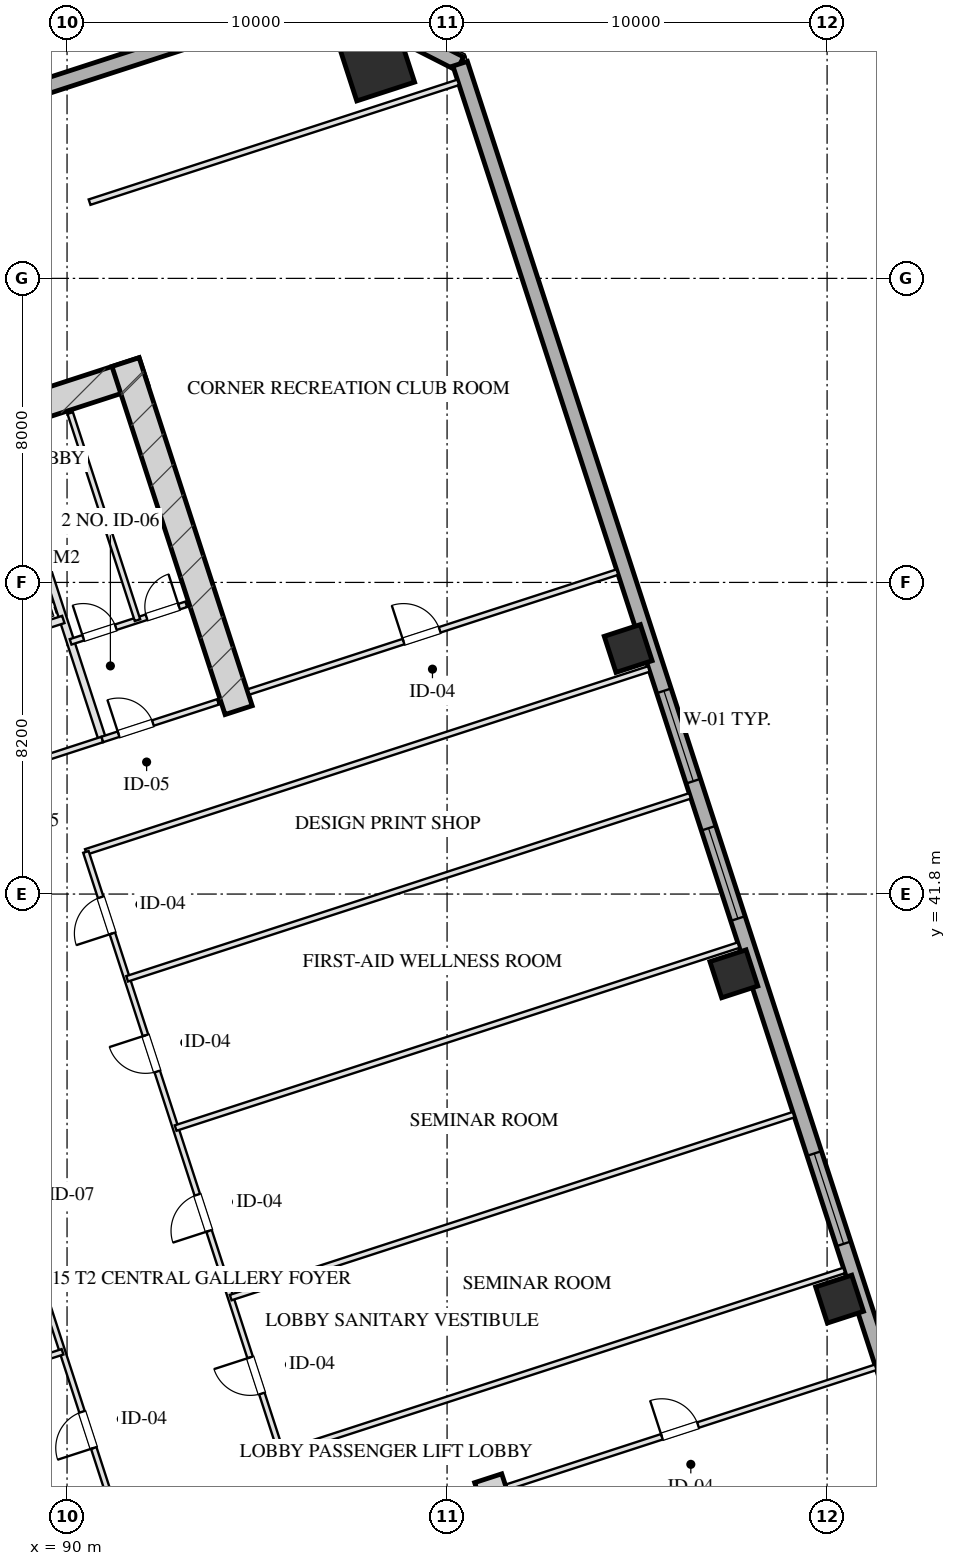
"""IFC4 building model, lengths in metres.
Left out: names, types, materials, properties, quantities, classifications, styles, units other than length and angle.
Written with IfcOpenShell. Run it as: python <this file> out.ifc"""

import sys

from ifc_helpers import new_model, si_unit, direction, frame, frame_2d, origin, origin_2d, place, context, subcontext, project, spatial, rectangle, hollow_rectangle, extrude, element, fill, save


model = new_model("IFC4")
c1 = context("Model", 3, precision=1e-05, world=origin(), true_north=direction((0.0, 1.0)))
c2 = subcontext(c1, "Body", "Model", "MODEL_VIEW")
j1 = project(units=[si_unit("LENGTHUNIT", "METRE"), si_unit("PLANEANGLEUNIT", "RADIAN")], contexts=[c1])
p1 = place(None, origin())
s1 = spatial("IfcSite", under=j1, at=p1, CompositionType="ELEMENT")
p2 = place(p1, origin())
s2 = spatial("IfcBuilding", under=s1, at=p2, CompositionType="ELEMENT")
p3 = place(p2, frame((0.0, 0.0, 64.4)))
s3 = spatial("IfcBuildingStorey", under=s2, at=p3, CompositionType="ELEMENT", Elevation=64.4)
p4 = place(p3, frame((101.082, 26.429, 0.0), z_axis=(0.0, 0.0, 1.0), x_axis=(0.309016134813, -0.951056795583, 0.0)))
e1 = element("IfcWall", 1, at=p4, inside=s3, PredefinedType="SHEAR", context=c2, shape_type="SweptSolid", body=[
    extrude(rectangle(XDim=9.63, YDim=0.75, at=frame_2d((4.815, 0.0))), origin(), (0.0, 0.0, 1.0), 3.45),
])
p5 = place(p3, frame((76.272, 50.443, 0.0), z_axis=(0.0, 0.0, 1.0), x_axis=(0.951056072937, 0.309018358888, 0.0)))
e2 = element("IfcWall", 2, at=p5, inside=s3, PredefinedType="SHEAR", context=c2, shape_type="SweptSolid", body=[
    extrude(rectangle(XDim=16.55, YDim=0.75, at=frame_2d((8.275, 0.0))), origin(), (0.0, 0.0, 1.0), 3.45),
])
p6 = place(p3, frame((94.515, 46.639, 0.0), z_axis=(0.0, 0.0, 1.0), x_axis=(-0.309016134813, 0.951056795583, 0.0)))
e3 = element("IfcWall", 3, at=p6, inside=s3, PredefinedType="SHEAR", context=c2, shape_type="SweptSolid", body=[
    extrude(rectangle(XDim=9.63, YDim=0.75, at=frame_2d((4.815, 0.0))), origin(), (0.0, 0.0, 1.0), 3.45),
])
p7 = place(p3, frame((98.137, 63.677, 0.0), z_axis=(0.0, 0.0, 1.0), x_axis=(0.951056516295, 0.309016994375, 0.0)))
e4 = element("IfcColumn", 4, at=p7, inside=s3, PredefinedType="COLUMN", context=c2, shape_type="SweptSolid", body=[
    extrude(hollow_rectangle(XDim=1.6, YDim=1.6, WallThickness=0.055, at=origin_2d()), origin(), (0.0, 0.0, 1.0), 3.451),
])
for number, where, z_axis, x_axis in (
    (5, (110.328, 31.142, 0.0), (0.0, 0.0, 1.0), (0.951, 0.309, 0.0)),
    (6, (107.547, 39.701, 0.0), (0.0, 0.0, 1.0), (0.951, 0.309, 0.0)),
    (7, (104.766, 48.261, 0.0), (0.0, 0.0, 1.0), (0.951, 0.309, 0.0)),
):
    element("IfcColumn", number, at=place(p3, frame(where, z_axis=z_axis, x_axis=x_axis)), inside=s3, PredefinedType="COLUMN", context=c2, shape_type="SweptSolid", body=[
        extrude(hollow_rectangle(XDim=1.0, YDim=1.0, WallThickness=0.036, at=origin_2d()), origin(), (0.0, 0.0, 1.0), 3.451),
    ])
p8 = place(p3, frame((66.002, 55.433, 0.0), z_axis=(0.0, 0.0, 1.0), x_axis=(0.951055939317, 0.309018770125, 0.0)))
e8 = element("IfcWall", 8, at=p8, inside=s3, PredefinedType="SOLIDWALL", context=c2, shape_type="SweptSolid", body=[
    extrude(rectangle(XDim=32.4, YDim=0.4, at=frame_2d((16.2, 0.0))), origin(), (0.0, 0.0, 1.0), 2.61),
])
p9 = place(p3, frame((96.816, 65.446, 0.0), z_axis=(0.0, 0.0, 1.0), x_axis=(0.890998089617, -0.454007053137, 0.0)))
e9 = element("IfcWall", 9, at=p9, inside=s3, PredefinedType="SOLIDWALL", context=c2, shape_type="SweptSolid", body=[
    extrude(rectangle(XDim=3.96, YDim=0.4, at=frame_2d((1.98, 0.0))), origin(), (0.0, 0.0, 1.0), 2.61),
])
p10 = place(p3, frame((100.345, 63.648, 0.0), z_axis=(0.0, 0.0, 1.0), x_axis=(0.309014526607, -0.951057318118, 0.0)))
e10 = element("IfcWall", 10, at=p10, inside=s3, PredefinedType="SOLIDWALL", context=c2, shape_type="SweptSolid", body=[
    extrude(rectangle(XDim=50.0, YDim=0.4, at=frame_2d((25.0, 0.0))), origin(), (0.0, 0.0, 1.0), 2.61),
])
p11 = place(p10, frame((30.15, 0.0, 0.75)))
e11 = element("IfcOpeningElement", 11, at=p11, cuts=e10, PredefinedType="OPENING", context=c2, shape_type="SweptSolid", body=[
    extrude(rectangle(XDim=2.5, YDim=1.46, at=frame_2d((1.25, 0.73))), frame((0.0, 0.21, 0.0), z_axis=(0.0, -1.0, 0.0), x_axis=(1.0, 0.0, 0.0)), (0.0, 0.0, 1.0), 0.42),
])
p12 = place(p10, frame((21.15, 0.0, 0.75)))
e12 = element("IfcOpeningElement", 12, at=p12, cuts=e10, PredefinedType="OPENING", context=c2, shape_type="SweptSolid", body=[
    extrude(rectangle(XDim=2.5, YDim=1.46, at=frame_2d((1.25, 0.73))), frame((0.0, 0.21, 0.0), z_axis=(0.0, -1.0, 0.0), x_axis=(1.0, 0.0, 0.0)), (0.0, 0.0, 1.0), 0.42),
])
p13 = place(p10, frame((17.35, 0.0, 0.75)))
e13 = element("IfcOpeningElement", 13, at=p13, cuts=e10, PredefinedType="OPENING", context=c2, shape_type="SweptSolid", body=[
    extrude(rectangle(XDim=2.5, YDim=1.46, at=frame_2d((1.25, 0.73))), frame((0.0, 0.21, 0.0), z_axis=(0.0, -1.0, 0.0), x_axis=(1.0, 0.0, 0.0)), (0.0, 0.0, 1.0), 0.42),
])
p14 = place(p3, frame((90.928, 45.868, 0.0), z_axis=(0.0, 0.0, 1.0), x_axis=(-0.309042196757, 0.951048327176, 0.0)))
e14 = element("IfcWall", 14, at=p14, inside=s3, PredefinedType="PARTITIONING", context=c2, shape_type="SweptSolid", body=[
    extrude(rectangle(XDim=8.43, YDim=0.2, at=frame_2d((4.215, 0.0))), origin(), (0.0, 0.0, 1.0), 3.175),
])
p15 = place(p3, frame((86.743, 44.508, 0.0), z_axis=(0.0, 0.0, 1.0), x_axis=(0.951063829732, 0.308994485023, 0.0)))
e15 = element("IfcWall", 15, at=p15, inside=s3, PredefinedType="PARTITIONING", context=c2, shape_type="SweptSolid", body=[
    extrude(rectangle(XDim=4.4, YDim=0.15, at=frame_2d((2.2, 0.0))), origin(), (0.0, 0.0, 1.0), 3.175),
])
p16 = place(p15, frame((1.45, 0.0, 0.0)))
e16 = element("IfcOpeningElement", 16, at=p16, cuts=e15, PredefinedType="OPENING", context=c2, shape_type="SweptSolid", body=[
    extrude(rectangle(XDim=1.5, YDim=2.05, at=frame_2d((0.75, 1.025))), frame((0.0, 0.085, 0.0), z_axis=(0.0, -1.0, 0.0), x_axis=(1.0, 0.0, 0.0)), (0.0, 0.0, 1.0), 0.17),
])
p17 = place(p3, frame((85.718, 47.666, 0.0), z_axis=(0.0, 0.0, 1.0), x_axis=(0.951058531764, 0.30901079133, 0.0)))
e17 = element("IfcWall", 17, at=p17, inside=s3, PredefinedType="PARTITIONING", context=c2, shape_type="SweptSolid", body=[
    extrude(rectangle(XDim=4.4, YDim=0.2, at=frame_2d((2.2, 0.0))), origin(), (0.0, 0.0, 1.0), 3.175),
])
p18 = place(p17, frame((0.45, 0.0, 0.0)))
e18 = element("IfcOpeningElement", 18, at=p18, cuts=e17, PredefinedType="OPENING", context=c2, shape_type="SweptSolid", body=[
    extrude(rectangle(XDim=1.1, YDim=2.05, at=frame_2d((0.55, 1.025))), frame((0.0, 0.11, 0.0), z_axis=(0.0, -1.0, 0.0), x_axis=(1.0, 0.0, 0.0)), (0.0, 0.0, 1.0), 0.22),
])
p19 = place(p17, frame((2.55, 0.0, 0.0)))
e19 = element("IfcOpeningElement", 19, at=p19, cuts=e17, PredefinedType="OPENING", context=c2, shape_type="SweptSolid", body=[
    extrude(rectangle(XDim=1.1, YDim=2.05, at=frame_2d((0.55, 1.025))), frame((0.0, 0.11, 0.0), z_axis=(0.0, -1.0, 0.0), x_axis=(1.0, 0.0, 0.0)), (0.0, 0.0, 1.0), 0.22),
])
p20 = place(p3, frame((90.928, 45.868, 0.0), z_axis=(0.0, 0.0, 1.0), x_axis=(0.951059297078, 0.309008435874, 0.0)))
e20 = element("IfcWall", 20, at=p20, inside=s3, PredefinedType="PARTITIONING", context=c2, shape_type="SweptSolid", body=[
    extrude(rectangle(XDim=3.2, YDim=0.15, at=frame_2d((1.6, 0.0))), origin(), (0.0, 0.0, 1.0), 3.175),
])
p21 = place(p20, frame((0.45, 0.0, 0.0)))
e21 = element("IfcOpeningElement", 21, at=p21, cuts=e20, PredefinedType="OPENING", context=c2, shape_type="SweptSolid", body=[
    extrude(rectangle(XDim=0.95, YDim=2.05, at=frame_2d((0.475, 1.025))), frame((0.0, 0.085, 0.0), z_axis=(0.0, -1.0, 0.0), x_axis=(1.0, 0.0, 0.0)), (0.0, 0.0, 1.0), 0.17),
])
p22 = place(p3, frame((90.094, 48.436, 0.0), z_axis=(0.0, 0.0, 1.0), x_axis=(0.951066581729, 0.308986014439, 0.0)))
e22 = element("IfcWall", 22, at=p22, inside=s3, PredefinedType="PARTITIONING", context=c2, shape_type="SweptSolid", body=[
    extrude(rectangle(XDim=3.2, YDim=0.15, at=frame_2d((1.6, 0.0))), origin(), (0.0, 0.0, 1.0), 3.175),
])
p23 = place(p22, frame((0.35, 0.0, 0.0)))
e23 = element("IfcOpeningElement", 23, at=p23, cuts=e22, PredefinedType="OPENING", context=c2, shape_type="SweptSolid", body=[
    extrude(rectangle(XDim=0.9, YDim=2.05, at=frame_2d((0.45, 1.025))), frame((0.0, 0.085, 0.0), z_axis=(0.0, -1.0, 0.0), x_axis=(1.0, 0.0, 0.0)), (0.0, 0.0, 1.0), 0.17),
])
p24 = place(p22, frame((2.1, 0.0, 0.0)))
e24 = element("IfcOpeningElement", 24, at=p24, cuts=e22, PredefinedType="OPENING", context=c2, shape_type="SweptSolid", body=[
    extrude(rectangle(XDim=0.9, YDim=2.05, at=frame_2d((0.45, 1.025))), frame((0.0, 0.085, 0.0), z_axis=(0.0, -1.0, 0.0), x_axis=(1.0, 0.0, 0.0)), (0.0, 0.0, 1.0), 0.17),
])
p25 = place(p3, frame((91.853, 49.007, 0.0), z_axis=(0.0, 0.0, 1.0), x_axis=(-0.309022487551, 0.951054731437, 0.0)))
e25 = element("IfcWall", 25, at=p25, inside=s3, PredefinedType="PARTITIONING", context=c2, shape_type="SweptSolid", body=[
    extrude(rectangle(XDim=5.73, YDim=0.15, at=frame_2d((2.865, 0.0))), origin(), (0.0, 0.0, 1.0), 3.175),
])
p26 = place(p3, frame((101.578, 26.196, 0.0), z_axis=(0.0, 0.0, 1.0), x_axis=(0.951059043131, 0.309009217467, 0.0)))
e26 = element("IfcWall", 26, at=p26, inside=s3, PredefinedType="PARTITIONING", context=c2, shape_type="SweptSolid", body=[
    extrude(rectangle(XDim=10.2, YDim=0.15, at=frame_2d((5.1, 0.0))), origin(), (0.0, 0.0, 1.0), 3.175),
])
p27 = place(p26, frame((4.284, 0.0, 0.0)))
e27 = element("IfcOpeningElement", 27, at=p27, cuts=e26, PredefinedType="OPENING", context=c2, shape_type="SweptSolid", body=[
    extrude(rectangle(XDim=1.0, YDim=2.05, at=frame_2d((0.5, 1.025))), frame((0.0, 0.085, 0.0), z_axis=(0.0, -1.0, 0.0), x_axis=(1.0, 0.0, 0.0)), (0.0, 0.0, 1.0), 0.17),
])
p28 = place(p3, frame((90.593, 60.006, 0.0), z_axis=(0.0, 0.0, 1.0), x_axis=(0.951059043131, 0.309009217467, 0.0)))
e28 = element("IfcWall", 28, at=p28, inside=s3, PredefinedType="PARTITIONING", context=c2, shape_type="SweptSolid", body=[
    extrude(rectangle(XDim=10.2, YDim=0.15, at=frame_2d((5.1, 0.0))), origin(), (0.0, 0.0, 1.0), 3.175),
])
p29 = place(p3, frame((94.78, 47.119, 0.0), z_axis=(0.0, 0.0, 1.0), x_axis=(0.951054294345, 0.309023832749, 0.0)))
e29 = element("IfcWall", 29, at=p29, inside=s3, PredefinedType="PARTITIONING", context=c2, shape_type="SweptSolid", body=[
    extrude(rectangle(XDim=10.2, YDim=0.15, at=frame_2d((5.1, 0.0))), origin(), (0.0, 0.0, 1.0), 3.175),
])
p30 = place(p29, frame((4.284, 0.0, 0.0)))
e30 = element("IfcOpeningElement", 30, at=p30, cuts=e29, PredefinedType="OPENING", context=c2, shape_type="SweptSolid", body=[
    extrude(rectangle(XDim=1.0, YDim=2.05, at=frame_2d((0.5, 1.025))), frame((0.0, 0.085, 0.0), z_axis=(0.0, -1.0, 0.0), x_axis=(1.0, 0.0, 0.0)), (0.0, 0.0, 1.0), 0.17),
])
for number, where, z_axis, x_axis in (
    (31, (95.638, 27.084, 0.0), (0.0, 0.0, 1.0), (0.951, 0.309, 0.0)),
    (32, (90.496, 42.909, 0.0), (0.0, 0.0, 1.0), (0.951, 0.309, 0.0)),
):
    element("IfcWall", number, at=place(p3, frame(where, z_axis=z_axis, x_axis=x_axis)), inside=s3, PredefinedType="PARTITIONING", context=c2, shape_type="SweptSolid", body=[
        extrude(rectangle(XDim=15.575, YDim=0.15, at=frame_2d((7.788, 0.0))), origin(), (0.0, 0.0, 1.0), 3.175),
    ])
p31 = place(p3, frame((91.216, 25.647, 0.0), z_axis=(0.0, 0.0, 1.0), x_axis=(-0.309022042254, 0.951054876125, 0.0)))
e33 = element("IfcWall", 33, at=p31, inside=s3, PredefinedType="PARTITIONING", context=c2, shape_type="SweptSolid", body=[
    extrude(rectangle(XDim=16.64, YDim=0.15, at=frame_2d((8.32, 0.0))), origin(), (0.0, 0.0, 1.0), 3.175),
])
p32 = place(p31, frame((1.66, 0.0, 0.0)))
e34 = element("IfcOpeningElement", 34, at=p32, cuts=e33, PredefinedType="OPENING", context=c2, shape_type="SweptSolid", body=[
    extrude(rectangle(XDim=1.0, YDim=2.05, at=frame_2d((0.5, 1.025))), frame((0.0, 0.085, 0.0), z_axis=(0.0, -1.0, 0.0), x_axis=(1.0, 0.0, 0.0)), (0.0, 0.0, 1.0), 0.17),
])
p33 = place(p31, frame((7.82, 0.0, 0.0)))
e35 = element("IfcOpeningElement", 35, at=p33, cuts=e33, PredefinedType="OPENING", context=c2, shape_type="SweptSolid", body=[
    extrude(rectangle(XDim=1.05, YDim=2.05, at=frame_2d((0.525, 1.025))), frame((0.0, 0.085, 0.0), z_axis=(0.0, -1.0, 0.0), x_axis=(1.0, 0.0, 0.0)), (0.0, 0.0, 1.0), 0.17),
])
p34 = place(p31, frame((13.98, 0.0, 0.0)))
e36 = element("IfcOpeningElement", 36, at=p34, cuts=e33, PredefinedType="OPENING", context=c2, shape_type="SweptSolid", body=[
    extrude(rectangle(XDim=1.0, YDim=2.05, at=frame_2d((0.5, 1.025))), frame((0.0, 0.085, 0.0), z_axis=(0.0, -1.0, 0.0), x_axis=(1.0, 0.0, 0.0)), (0.0, 0.0, 1.0), 0.17),
])
p35 = place(p3, frame((95.638, 27.084, 0.0), z_axis=(0.0, 0.0, 1.0), x_axis=(-0.30901773025, 0.951056277195, 0.0)))
e37 = element("IfcWall", 37, at=p35, inside=s3, PredefinedType="PARTITIONING", context=c2, shape_type="SweptSolid", body=[
    extrude(rectangle(XDim=16.64, YDim=0.15, at=frame_2d((8.32, 0.0))), origin(), (0.0, 0.0, 1.0), 3.175),
])
p36 = place(p35, frame((1.655, 0.0, 0.0)))
e38 = element("IfcOpeningElement", 38, at=p36, cuts=e37, PredefinedType="OPENING", context=c2, shape_type="SweptSolid", body=[
    extrude(rectangle(XDim=1.0, YDim=2.05, at=frame_2d((0.5, 1.025))), frame((0.0, 0.085, 0.0), z_axis=(0.0, -1.0, 0.0), x_axis=(1.0, 0.0, 0.0)), (0.0, 0.0, 1.0), 0.17),
])
p37 = place(p35, frame((6.155, 0.0, 0.0)))
e39 = element("IfcOpeningElement", 39, at=p37, cuts=e37, PredefinedType="OPENING", context=c2, shape_type="SweptSolid", body=[
    extrude(rectangle(XDim=1.0, YDim=2.05, at=frame_2d((0.5, 1.025))), frame((0.0, 0.085, 0.0), z_axis=(0.0, -1.0, 0.0), x_axis=(1.0, 0.0, 0.0)), (0.0, 0.0, 1.0), 0.17),
])
p38 = place(p35, frame((10.565, 0.0, 0.0)))
e40 = element("IfcOpeningElement", 40, at=p38, cuts=e37, PredefinedType="OPENING", context=c2, shape_type="SweptSolid", body=[
    extrude(rectangle(XDim=1.0, YDim=2.05, at=frame_2d((0.5, 1.025))), frame((0.0, 0.085, 0.0), z_axis=(0.0, -1.0, 0.0), x_axis=(1.0, 0.0, 0.0)), (0.0, 0.0, 1.0), 0.17),
])
p39 = place(p35, frame((14.385, 0.0, 0.0)))
e41 = element("IfcOpeningElement", 41, at=p39, cuts=e37, PredefinedType="OPENING", context=c2, shape_type="SweptSolid", body=[
    extrude(rectangle(XDim=1.0, YDim=2.05, at=frame_2d((0.5, 1.025))), frame((0.0, 0.085, 0.0), z_axis=(0.0, -1.0, 0.0), x_axis=(1.0, 0.0, 0.0)), (0.0, 0.0, 1.0), 0.17),
])
p40 = place(p3, frame((73.356, 24.386, 0.0), z_axis=(0.0, 0.0, 1.0), x_axis=(0.951057299418, 0.309014584159, 0.0)))
e42 = element("IfcWall", 42, at=p40, inside=s3, PredefinedType="PARTITIONING", context=c2, shape_type="SweptSolid", body=[
    extrude(rectangle(XDim=17.375, YDim=0.15, at=frame_2d((8.688, 0.0))), origin(), (0.0, 0.0, 1.0), 3.175),
])
for number, where, z_axis, x_axis in (
    (43, (94.306, 31.183, 0.0), (0.0, 0.0, 1.0), (0.951, 0.309, 0.0)),
    (44, (92.857, 35.643, 0.0), (0.0, 0.0, 1.0), (0.951, 0.309, 0.0)),
    (45, (91.581, 39.57, 0.0), (0.0, 0.0, 1.0), (0.951, 0.309, 0.0)),
):
    element("IfcWall", number, at=place(p3, frame(where, z_axis=z_axis, x_axis=x_axis)), inside=s3, PredefinedType="PARTITIONING", context=c2, shape_type="SweptSolid", body=[
        extrude(rectangle(XDim=15.575, YDim=0.15, at=frame_2d((7.788, 0.0))), origin(), (0.0, 0.0, 1.0), 3.175),
    ])
p41 = place(p11, origin())
e46 = element("IfcWindow", 46, at=p41, inside=s3, PartitioningType="TRIPLE_PANEL_VERTICAL", PredefinedType="WINDOW", context=c2, shape_type="SweptSolid", body=[
    extrude(rectangle(XDim=2.5, YDim=1.46, at=frame_2d((1.25, 0.73))), frame((0.0, 0.03, 0.0), z_axis=(0.0, -1.0, 0.0), x_axis=(1.0, 0.0, 0.0)), (0.0, 0.0, 1.0), 0.06),
])
fill(e11, e46)
p42 = place(p12, origin())
e47 = element("IfcWindow", 47, at=p42, inside=s3, PartitioningType="TRIPLE_PANEL_VERTICAL", PredefinedType="WINDOW", context=c2, shape_type="SweptSolid", body=[
    extrude(rectangle(XDim=2.5, YDim=1.46, at=frame_2d((1.25, 0.73))), frame((0.0, 0.03, 0.0), z_axis=(0.0, -1.0, 0.0), x_axis=(1.0, 0.0, 0.0)), (0.0, 0.0, 1.0), 0.06),
])
fill(e12, e47)
p43 = place(p13, origin())
e48 = element("IfcWindow", 48, at=p43, inside=s3, PartitioningType="TRIPLE_PANEL_VERTICAL", PredefinedType="WINDOW", context=c2, shape_type="SweptSolid", body=[
    extrude(rectangle(XDim=2.5, YDim=1.46, at=frame_2d((1.25, 0.73))), frame((0.0, 0.03, 0.0), z_axis=(0.0, -1.0, 0.0), x_axis=(1.0, 0.0, 0.0)), (0.0, 0.0, 1.0), 0.06),
])
fill(e13, e48)
p44 = place(p21, origin())
e49 = element("IfcDoor", 49, at=p44, inside=s3, OperationType="SINGLE_SWING_LEFT", PredefinedType="DOOR", context=c2, shape_type="SweptSolid", body=[
    extrude(rectangle(XDim=0.95, YDim=2.05, at=frame_2d((0.475, 1.025))), frame((0.0, 0.025, 0.0), z_axis=(0.0, -1.0, 0.0), x_axis=(1.0, 0.0, 0.0)), (0.0, 0.0, 1.0), 0.05),
])
fill(e21, e49)
p45 = place(p23, origin())
e50 = element("IfcDoor", 50, at=p45, inside=s3, OperationType="SINGLE_SWING_LEFT", PredefinedType="DOOR", context=c2, shape_type="SweptSolid", body=[
    extrude(rectangle(XDim=0.9, YDim=2.05, at=frame_2d((0.45, 1.025))), frame((0.0, 0.025, 0.0), z_axis=(0.0, -1.0, 0.0), x_axis=(1.0, 0.0, 0.0)), (0.0, 0.0, 1.0), 0.05),
])
fill(e23, e50)
p46 = place(p24, origin())
e51 = element("IfcDoor", 51, at=p46, inside=s3, OperationType="SINGLE_SWING_RIGHT", PredefinedType="DOOR", context=c2, shape_type="SweptSolid", body=[
    extrude(rectangle(XDim=0.9, YDim=2.05, at=frame_2d((0.45, 1.025))), frame((0.0, 0.025, 0.0), z_axis=(0.0, -1.0, 0.0), x_axis=(1.0, 0.0, 0.0)), (0.0, 0.0, 1.0), 0.05),
])
fill(e24, e51)
p47 = place(p27, origin())
e52 = element("IfcDoor", 52, at=p47, inside=s3, OperationType="SINGLE_SWING_LEFT", PredefinedType="DOOR", context=c2, shape_type="SweptSolid", body=[
    extrude(rectangle(XDim=1.0, YDim=2.05, at=frame_2d((0.5, 1.025))), frame((0.0, 0.025, 0.0), z_axis=(0.0, -1.0, 0.0), x_axis=(1.0, 0.0, 0.0)), (0.0, 0.0, 1.0), 0.05),
])
fill(e27, e52)
p48 = place(p30, origin())
e53 = element("IfcDoor", 53, at=p48, inside=s3, OperationType="SINGLE_SWING_LEFT", PredefinedType="DOOR", context=c2, shape_type="SweptSolid", body=[
    extrude(rectangle(XDim=1.0, YDim=2.05, at=frame_2d((0.5, 1.025))), frame((0.0, 0.025, 0.0), z_axis=(0.0, -1.0, 0.0), x_axis=(1.0, 0.0, 0.0)), (0.0, 0.0, 1.0), 0.05),
])
fill(e30, e53)
p49 = place(p32, origin())
e54 = element("IfcDoor", 54, at=p49, inside=s3, OperationType="SINGLE_SWING_LEFT", PredefinedType="DOOR", context=c2, shape_type="SweptSolid", body=[
    extrude(rectangle(XDim=1.0, YDim=2.05, at=frame_2d((0.5, 1.025))), frame((0.0, 0.025, 0.0), z_axis=(0.0, -1.0, 0.0), x_axis=(1.0, 0.0, 0.0)), (0.0, 0.0, 1.0), 0.05),
])
fill(e34, e54)
p50 = place(p36, origin())
e55 = element("IfcDoor", 55, at=p50, inside=s3, OperationType="SINGLE_SWING_RIGHT", PredefinedType="DOOR", context=c2, shape_type="SweptSolid", body=[
    extrude(rectangle(XDim=1.0, YDim=2.05, at=frame_2d((0.5, 1.025))), frame((0.0, 0.025, 0.0), z_axis=(0.0, -1.0, 0.0), x_axis=(1.0, 0.0, 0.0)), (0.0, 0.0, 1.0), 0.05),
])
fill(e38, e55)
p51 = place(p37, origin())
e56 = element("IfcDoor", 56, at=p51, inside=s3, OperationType="SINGLE_SWING_LEFT", PredefinedType="DOOR", context=c2, shape_type="SweptSolid", body=[
    extrude(rectangle(XDim=1.0, YDim=2.05, at=frame_2d((0.5, 1.025))), frame((0.0, 0.025, 0.0), z_axis=(0.0, -1.0, 0.0), x_axis=(1.0, 0.0, 0.0)), (0.0, 0.0, 1.0), 0.05),
])
fill(e39, e56)
p52 = place(p38, origin())
e57 = element("IfcDoor", 57, at=p52, inside=s3, OperationType="SINGLE_SWING_RIGHT", PredefinedType="DOOR", context=c2, shape_type="SweptSolid", body=[
    extrude(rectangle(XDim=1.0, YDim=2.05, at=frame_2d((0.5, 1.025))), frame((0.0, 0.025, 0.0), z_axis=(0.0, -1.0, 0.0), x_axis=(1.0, 0.0, 0.0)), (0.0, 0.0, 1.0), 0.05),
])
fill(e40, e57)
p53 = place(p39, origin())
e58 = element("IfcDoor", 58, at=p53, inside=s3, OperationType="SINGLE_SWING_LEFT", PredefinedType="DOOR", context=c2, shape_type="SweptSolid", body=[
    extrude(rectangle(XDim=1.0, YDim=2.05, at=frame_2d((0.5, 1.025))), frame((0.0, 0.025, 0.0), z_axis=(0.0, -1.0, 0.0), x_axis=(1.0, 0.0, 0.0)), (0.0, 0.0, 1.0), 0.05),
])
fill(e41, e58)
save(model, sys.argv[1])
